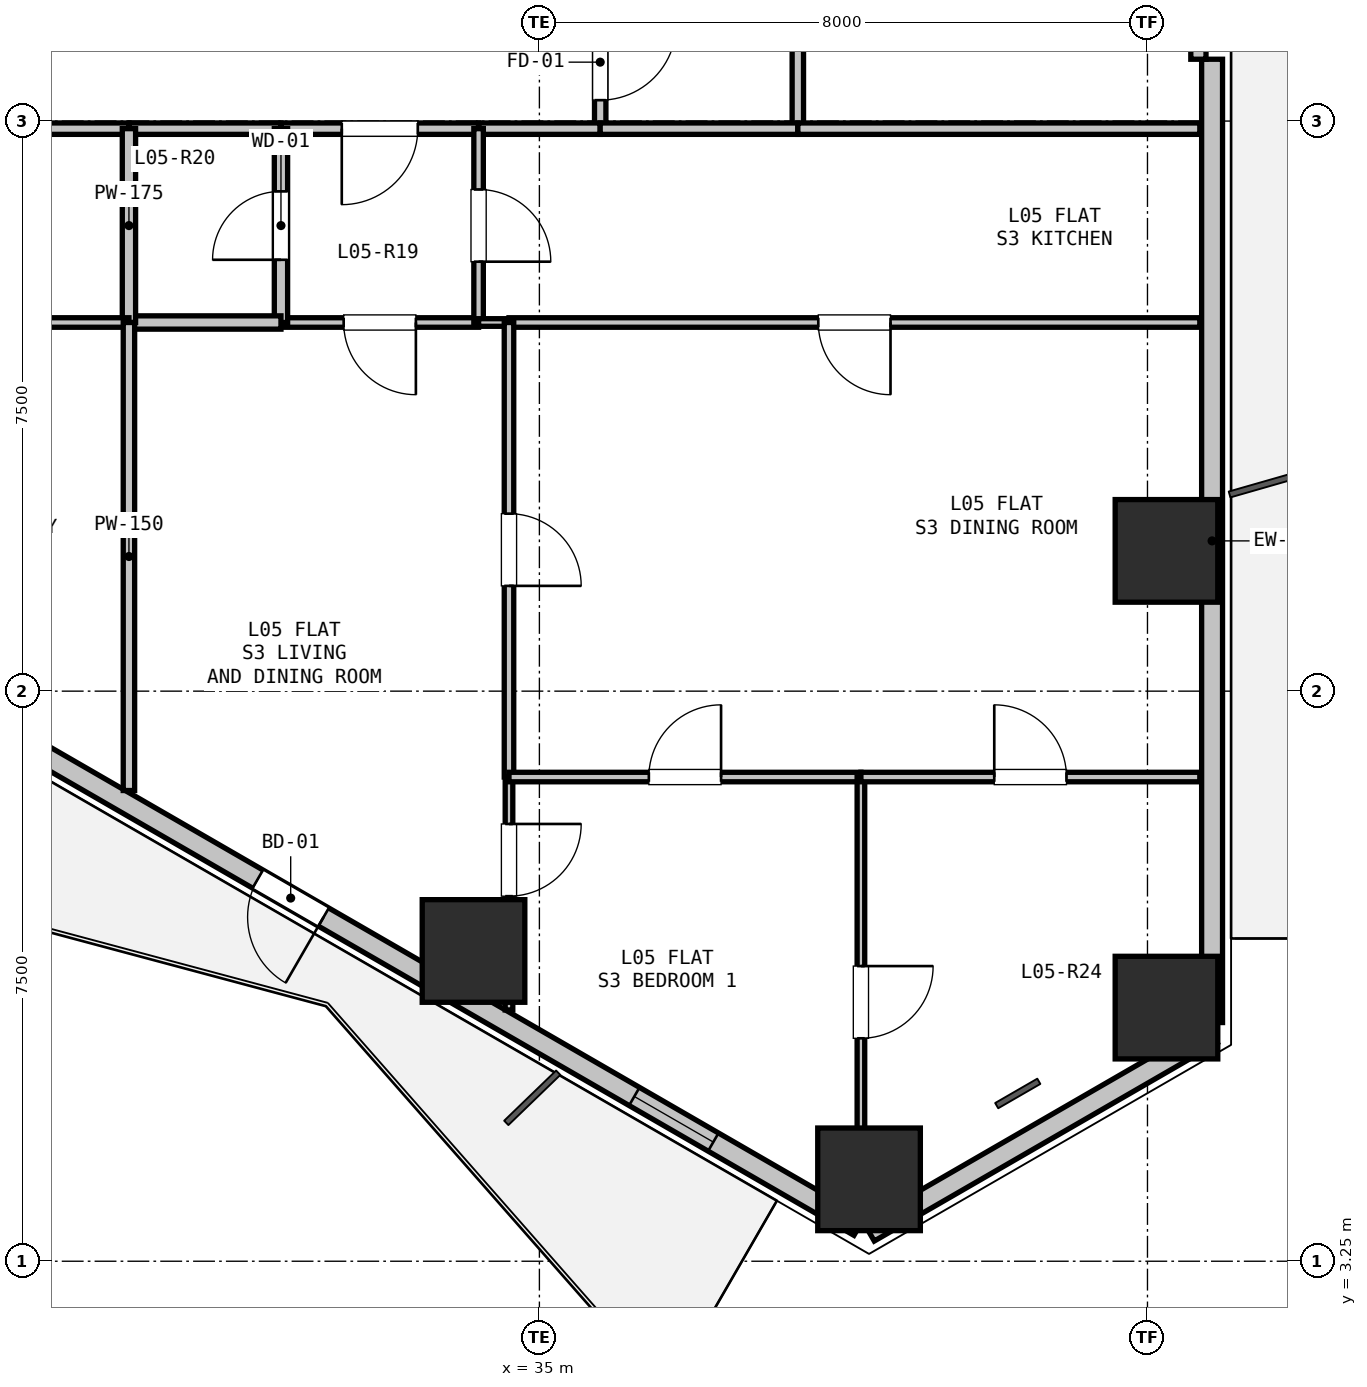
"""IFC4 building model, lengths in metres.
Left out: names, types, materials, properties, quantities, classifications, styles, units other than length and angle.
Written with IfcOpenShell. Run it as: python <this file> out.ifc"""

import sys

from ifc_helpers import new_model, si_unit, direction, frame, frame_2d, origin, origin_2d, place, context, subcontext, project, spatial, rectangle, hollow_rectangle, extrude, element, fill, save


model = new_model("IFC4")
c1 = context("Model", 3, precision=1e-05, world=origin(), true_north=direction((0.0, 1.0)))
c2 = subcontext(c1, "Body", "Model", "MODEL_VIEW")
j1 = project(units=[si_unit("LENGTHUNIT", "METRE"), si_unit("PLANEANGLEUNIT", "RADIAN")], contexts=[c1])
p1 = place(None, origin())
s1 = spatial("IfcSite", under=j1, at=p1, CompositionType="ELEMENT")
p2 = place(p1, origin())
s2 = spatial("IfcBuilding", under=s1, at=p2, CompositionType="ELEMENT")
p3 = place(p2, frame((0.0, 0.0, 22.5)))
s3 = spatial("IfcBuildingStorey", under=s2, at=p3, CompositionType="ELEMENT", Elevation=22.5)
for number, where, z_axis, x_axis in (
    (1, (43.25, 12.595, 0.0), (0.0, 0.0, 1.0), (1.0, 0.0, 0.0)),
    (2, (43.25, 6.587, 0.0), (0.0, 0.0, 1.0), (1.0, 0.0, 0.0)),
    (3, (39.337, 4.327, 0.0), (0.0, 0.0, 1.0), (1.0, 0.0, 0.0)),
    (4, (34.133, 7.332, 0.0), (0.0, 0.0, 1.0), (1.0, 0.0, 0.0)),
):
    element("IfcColumn", number, at=place(p3, frame(where, z_axis=z_axis, x_axis=x_axis)), inside=s3, PredefinedType="COLUMN", context=c2, shape_type="SweptSolid", body=[
        extrude(hollow_rectangle(XDim=1.35, YDim=1.35, WallThickness=0.036, at=origin_2d()), origin(), (0.0, 0.0, 1.0), 3.3),
    ])
p4 = place(p3, frame((43.85, 6.24, 0.0), z_axis=(0.0, 0.0, 1.0), x_axis=(-0.866043601342, -0.499968479581, 0.0)))
e5 = element("IfcWall", 5, at=p4, inside=s3, PredefinedType="SOLIDWALL", context=c2, shape_type="SweptSolid", body=[
    extrude(rectangle(XDim=5.211, YDim=0.275, at=frame_2d((2.605, 0.0))), origin(), (0.0, 0.0, 1.0), 2.66),
])
p5 = place(p3, frame((43.85, 19.063, 0.0), z_axis=(0.0, 0.0, 1.0), x_axis=(0.0, -1.0, 0.0)))
e6 = element("IfcWall", 6, at=p5, inside=s3, PredefinedType="SOLIDWALL", context=c2, shape_type="SweptSolid", body=[
    extrude(rectangle(XDim=12.673, YDim=0.275, at=frame_2d((6.336, 0.0))), origin(), (0.0, 0.0, 1.0), 2.66),
])
p6 = place(p3, frame((43.67, 20.763, 0.0), z_axis=(0.0, 0.0, 1.0), x_axis=(0.0, -1.0, 0.0)))
e7 = element("IfcWall", 7, at=p6, inside=s3, PredefinedType="PARAPET", context=c2, shape_type="SweptSolid", body=[
    extrude(rectangle(XDim=1.7, YDim=0.2, at=frame_2d((0.85, 0.0))), origin(), (0.0, 0.0, 1.0), 2.66),
])
p7 = place(p3, frame((39.207, 3.71, 0.0), z_axis=(0.0, 0.0, 1.0), x_axis=(-0.86603192154, 0.499988710747, 0.0)))
e8 = element("IfcWall", 8, at=p7, inside=s3, PredefinedType="SOLIDWALL", context=c2, shape_type="SweptSolid", body=[
    extrude(rectangle(XDim=12.673, YDim=0.275, at=frame_2d((6.336, 0.0))), origin(), (0.0, 0.0, 1.0), 2.66),
])
p8 = place(p7, frame((8.136, 0.0, 0.0)))
e9 = element("IfcOpeningElement", 9, at=p8, cuts=e8, PredefinedType="OPENING", context=c2, shape_type="SweptSolid", body=[
    extrude(rectangle(XDim=1.0, YDim=2.1, at=frame_2d((0.5, 1.05))), frame((0.0, 0.147, 0.0), z_axis=(0.0, -1.0, 0.0), x_axis=(1.0, 0.0, 0.0)), (0.0, 0.0, 1.0), 0.295),
])
p9 = place(p7, frame((2.216, 0.0, 0.9)))
e10 = element("IfcOpeningElement", 10, at=p9, cuts=e8, PredefinedType="OPENING", context=c2, shape_type="SweptSolid", body=[
    extrude(rectangle(XDim=1.2, YDim=1.4, at=frame_2d((0.6, 0.7))), frame((0.0, 0.147, 0.0), z_axis=(0.0, -1.0, 0.0), x_axis=(1.0, 0.0, 0.0)), (0.0, 0.0, 1.0), 0.295),
])
p10 = place(p3, frame((35.8, 19.9, 0.0), z_axis=(0.0, 0.0, 1.0), x_axis=(0.0, -1.0, 0.0)))
e11 = element("IfcWall", 11, at=p10, inside=s3, PredefinedType="PARTITIONING", context=c2, shape_type="SweptSolid", body=[
    extrude(rectangle(XDim=1.75, YDim=0.15, at=frame_2d((0.875, 0.0))), origin(), (0.0, 0.0, 1.0), 3.04),
])
p11 = place(p10, frame((0.375, 0.0, 0.0)))
e12 = element("IfcOpeningElement", 12, at=p11, cuts=e11, PredefinedType="OPENING", context=c2, shape_type="SweptSolid", body=[
    extrude(rectangle(XDim=1.0, YDim=2.15, at=frame_2d((0.5, 1.075))), frame((0.0, 0.085, 0.0), z_axis=(0.0, -1.0, 0.0), x_axis=(1.0, 0.0, 0.0)), (0.0, 0.0, 1.0), 0.17),
])
p12 = place(p3, frame((35.8, 18.15, 0.0), z_axis=(0.0, 0.0, 1.0), x_axis=(-1.0, 0.0, 0.0)))
e13 = element("IfcWall", 13, at=p12, inside=s3, PredefinedType="PARTITIONING", context=c2, shape_type="SweptSolid", body=[
    extrude(rectangle(XDim=1.6, YDim=0.15, at=frame_2d((0.8, 0.0))), origin(), (0.0, 0.0, 1.0), 3.04),
])
p13 = place(p3, frame((34.2, 18.15, 0.0), z_axis=(0.0, 0.0, 1.0), x_axis=(-1.0, 0.0, 0.0)))
e14 = element("IfcWall", 14, at=p13, inside=s3, PredefinedType="PARTITIONING", context=c2, shape_type="SweptSolid", body=[
    extrude(rectangle(XDim=2.6, YDim=0.15, at=frame_2d((1.3, 0.0))), origin(), (0.0, 0.0, 1.0), 3.04),
])
p14 = place(p13, frame((0.8, 0.0, 0.0)))
e15 = element("IfcOpeningElement", 15, at=p14, cuts=e14, PredefinedType="OPENING", context=c2, shape_type="SweptSolid", body=[
    extrude(rectangle(XDim=1.0, YDim=2.15, at=frame_2d((0.5, 1.075))), frame((0.0, 0.085, 0.0), z_axis=(0.0, -1.0, 0.0), x_axis=(1.0, 0.0, 0.0)), (0.0, 0.0, 1.0), 0.17),
])
p15 = place(p3, frame((31.6, 18.15, 0.0), z_axis=(0.0, 0.0, 1.0), x_axis=(-1.0, 0.0, 0.0)))
e16 = element("IfcWall", 16, at=p15, inside=s3, PredefinedType="PARTITIONING", context=c2, shape_type="SweptSolid", body=[
    extrude(rectangle(XDim=2.0, YDim=0.15, at=frame_2d((1.0, 0.0))), origin(), (0.0, 0.0, 1.0), 3.04),
])
p16 = place(p3, frame((29.6, 18.15, 0.0), z_axis=(0.0, 0.0, 1.0), x_axis=(-1.0, 0.0, 0.0)))
e17 = element("IfcWall", 17, at=p16, inside=s3, PredefinedType="PARTITIONING", context=c2, shape_type="SweptSolid", body=[
    extrude(rectangle(XDim=2.5, YDim=0.15, at=frame_2d((1.25, 0.0))), origin(), (0.0, 0.0, 1.0), 3.04),
])
p17 = place(p3, frame((38.4, 21.4, 0.0), z_axis=(0.0, 0.0, 1.0), x_axis=(0.0, -1.0, 0.0)))
e18 = element("IfcWall", 18, at=p17, inside=s3, PredefinedType="PARTITIONING", context=c2, shape_type="SweptSolid", body=[
    extrude(rectangle(XDim=3.25, YDim=0.15, at=frame_2d((1.625, 0.0))), origin(), (0.0, 0.0, 1.0), 3.04),
])
p18 = place(p3, frame((38.4, 18.15, 0.0), z_axis=(0.0, 0.0, 1.0), x_axis=(-1.0, 0.0, 0.0)))
e19 = element("IfcWall", 19, at=p18, inside=s3, PredefinedType="PARTITIONING", context=c2, shape_type="SweptSolid", body=[
    extrude(rectangle(XDim=2.6, YDim=0.15, at=frame_2d((1.3, 0.0))), origin(), (0.0, 0.0, 1.0), 2.337),
])
p19 = place(p3, frame((34.2, 15.6, 0.0), z_axis=(0.0, 0.0, 1.0), x_axis=(-1.0, 0.0, 0.0)))
e20 = element("IfcWall", 20, at=p19, inside=s3, PredefinedType="PARTITIONING", context=c2, shape_type="SweptSolid", body=[
    extrude(rectangle(XDim=2.6, YDim=0.125, at=frame_2d((1.3, 0.0))), origin(), (0.0, 0.0, 1.0), 3.04),
])
p20 = place(p19, frame((0.825, 0.0, 0.0)))
e21 = element("IfcOpeningElement", 21, at=p20, cuts=e20, PredefinedType="OPENING", context=c2, shape_type="SweptSolid", body=[
    extrude(rectangle(XDim=0.95, YDim=2.1, at=frame_2d((0.475, 1.05))), frame((0.0, 0.073, 0.0), z_axis=(0.0, -1.0, 0.0), x_axis=(1.0, 0.0, 0.0)), (0.0, 0.0, 1.0), 0.145),
])
p21 = place(p3, frame((31.6, 15.6, 0.0), z_axis=(0.0, 0.0, 1.0), x_axis=(0.0, 1.0, 0.0)))
e22 = element("IfcWall", 22, at=p21, inside=s3, PredefinedType="PLUMBINGWALL", context=c2, shape_type="SweptSolid", body=[
    extrude(rectangle(XDim=2.55, YDim=0.175, at=frame_2d((1.275, 0.0))), origin(), (0.0, 0.0, 1.0), 3.04),
])
p22 = place(p21, frame((0.825, 0.0, 0.0)))
e23 = element("IfcOpeningElement", 23, at=p22, cuts=e22, PredefinedType="OPENING", context=c2, shape_type="SweptSolid", body=[
    extrude(rectangle(XDim=0.9, YDim=2.1, at=frame_2d((0.45, 1.05))), frame((0.0, 0.097, 0.0), z_axis=(0.0, -1.0, 0.0), x_axis=(1.0, 0.0, 0.0)), (0.0, 0.0, 1.0), 0.195),
])
p23 = place(p3, frame((34.2, 18.15, 0.0), z_axis=(0.0, 0.0, 1.0), x_axis=(0.0, -1.0, 0.0)))
e24 = element("IfcWall", 24, at=p23, inside=s3, PredefinedType="PARTITIONING", context=c2, shape_type="SweptSolid", body=[
    extrude(rectangle(XDim=2.55, YDim=0.125, at=frame_2d((1.275, 0.0))), origin(), (0.0, 0.0, 1.0), 3.04),
])
p24 = place(p23, frame((0.8, 0.0, 0.0)))
e25 = element("IfcOpeningElement", 25, at=p24, cuts=e24, PredefinedType="OPENING", context=c2, shape_type="SweptSolid", body=[
    extrude(rectangle(XDim=0.95, YDim=2.1, at=frame_2d((0.475, 1.05))), frame((0.0, 0.073, 0.0), z_axis=(0.0, -1.0, 0.0), x_axis=(1.0, 0.0, 0.0)), (0.0, 0.0, 1.0), 0.145),
])
p25 = place(p3, frame((31.6, 15.6, 0.0), z_axis=(0.0, 0.0, 1.0), x_axis=(-1.0, 0.0, 0.0)))
e26 = element("IfcWall", 26, at=p25, inside=s3, PredefinedType="PLUMBINGWALL", context=c2, shape_type="SweptSolid", body=[
    extrude(rectangle(XDim=2.0, YDim=0.175, at=frame_2d((1.0, 0.0))), origin(), (0.0, 0.0, 1.0), 3.04),
])
p26 = place(p3, frame((29.6, 15.6, 0.0), z_axis=(0.0, 0.0, 1.0), x_axis=(0.0, 1.0, 0.0)))
e27 = element("IfcWall", 27, at=p26, inside=s3, PredefinedType="PLUMBINGWALL", context=c2, shape_type="SweptSolid", body=[
    extrude(rectangle(XDim=2.55, YDim=0.175, at=frame_2d((1.275, 0.0))), origin(), (0.0, 0.0, 1.0), 3.04),
])
p27 = place(p3, frame((38.4, 18.15, 0.0), z_axis=(0.0, 0.0, 1.0), x_axis=(1.0, 0.0, 0.0)))
e28 = element("IfcWall", 28, at=p27, inside=s3, PredefinedType="PARTITIONING", context=c2, shape_type="SweptSolid", body=[
    extrude(rectangle(XDim=5.289, YDim=0.15, at=frame_2d((2.644, 0.0))), origin(), (0.0, 0.0, 1.0), 2.365),
])
p28 = place(p3, frame((43.688, 15.6, 0.0), z_axis=(0.0, 0.0, 1.0), x_axis=(-1.0, 0.0, 0.0)))
e29 = element("IfcWall", 29, at=p28, inside=s3, PredefinedType="PARTITIONING", context=c2, shape_type="SweptSolid", body=[
    extrude(rectangle(XDim=9.088, YDim=0.125, at=frame_2d((4.544, 0.0))), origin(), (0.0, 0.0, 1.0), 2.337),
])
p29 = place(p28, frame((4.069, 0.0, 0.0)))
e30 = element("IfcOpeningElement", 30, at=p29, cuts=e29, PredefinedType="OPENING", context=c2, shape_type="SweptSolid", body=[
    extrude(rectangle(XDim=0.95, YDim=2.1, at=frame_2d((0.475, 1.05))), frame((0.0, 0.073, 0.0), z_axis=(0.0, -1.0, 0.0), x_axis=(1.0, 0.0, 0.0)), (0.0, 0.0, 1.0), 0.145),
])
p30 = place(p3, frame((34.6, 15.6, 0.0), z_axis=(0.0, 0.0, 1.0), x_axis=(-1.0, 0.0, 0.0)))
e31 = element("IfcWall", 31, at=p30, inside=s3, PredefinedType="PARTITIONING", context=c2, shape_type="SweptSolid", body=[
    extrude(rectangle(XDim=0.4, YDim=0.1, at=frame_2d((0.2, 0.0))), origin(), (0.0, 0.0, 1.0), 3.04),
])
p31 = place(p3, frame((27.1, 15.6, 0.0), z_axis=(0.0, 0.0, 1.0), x_axis=(1.0, 0.0, 0.0)))
e32 = element("IfcWall", 32, at=p31, inside=s3, PredefinedType="PARTITIONING", context=c2, shape_type="SweptSolid", body=[
    extrude(rectangle(XDim=2.5, YDim=0.125, at=frame_2d((1.25, 0.0))), origin(), (0.0, 0.0, 1.0), 3.04),
])
p32 = place(p3, frame((29.6, 15.6, 0.0), z_axis=(0.0, 0.0, 1.0), x_axis=(0.0, -1.0, 0.0)))
e33 = element("IfcWall", 33, at=p32, inside=s3, PredefinedType="PARTITIONING", context=c2, shape_type="SweptSolid", body=[
    extrude(rectangle(XDim=6.157, YDim=0.15, at=frame_2d((3.079, 0.0))), origin(), (0.0, 0.0, 1.0), 2.337),
])
p33 = place(p3, frame((34.6, 15.6, 0.0), z_axis=(0.0, 0.0, 1.0), x_axis=(0.0, -1.0, 0.0)))
e34 = element("IfcWall", 34, at=p33, inside=s3, PredefinedType="PARTITIONING", context=c2, shape_type="SweptSolid", body=[
    extrude(rectangle(XDim=5.98, YDim=0.125, at=frame_2d((2.99, 0.0))), origin(), (0.0, 0.0, 1.0), 3.04),
])
p34 = place(p33, frame((2.515, 0.0, 0.0)))
e35 = element("IfcOpeningElement", 35, at=p34, cuts=e34, PredefinedType="OPENING", context=c2, shape_type="SweptSolid", body=[
    extrude(rectangle(XDim=0.95, YDim=2.1, at=frame_2d((0.475, 1.05))), frame((0.0, 0.073, 0.0), z_axis=(0.0, -1.0, 0.0), x_axis=(1.0, 0.0, 0.0)), (0.0, 0.0, 1.0), 0.145),
])
p35 = place(p3, frame((34.6, 9.62, 0.0), z_axis=(0.0, 0.0, 1.0), x_axis=(0.0, -1.0, 0.0)))
e36 = element("IfcWall", 36, at=p35, inside=s3, PredefinedType="PARTITIONING", context=c2, shape_type="SweptSolid", body=[
    extrude(rectangle(XDim=3.064, YDim=0.1, at=frame_2d((1.532, 0.0))), origin(), (0.0, 0.0, 1.0), 2.65),
])
p36 = place(p35, frame((0.617, 0.0, 0.0)))
e37 = element("IfcOpeningElement", 37, at=p36, cuts=e36, PredefinedType="OPENING", context=c2, shape_type="SweptSolid", body=[
    extrude(rectangle(XDim=0.95, YDim=2.1, at=frame_2d((0.475, 1.05))), frame((0.0, 0.06, 0.0), z_axis=(0.0, -1.0, 0.0), x_axis=(1.0, 0.0, 0.0)), (0.0, 0.0, 1.0), 0.12),
])
p37 = place(p3, frame((34.6, 9.62, 0.0), z_axis=(0.0, 0.0, 1.0), x_axis=(1.0, 0.0, 0.0)))
e38 = element("IfcWall", 38, at=p37, inside=s3, PredefinedType="PARTITIONING", context=c2, shape_type="SweptSolid", body=[
    extrude(rectangle(XDim=4.63, YDim=0.125, at=frame_2d((2.315, 0.0))), origin(), (0.0, 0.0, 1.0), 3.04),
])
p38 = place(p37, frame((1.84, 0.0, 0.0)))
e39 = element("IfcOpeningElement", 39, at=p38, cuts=e38, PredefinedType="OPENING", context=c2, shape_type="SweptSolid", body=[
    extrude(rectangle(XDim=0.95, YDim=2.1, at=frame_2d((0.475, 1.05))), frame((0.0, 0.073, 0.0), z_axis=(0.0, -1.0, 0.0), x_axis=(1.0, 0.0, 0.0)), (0.0, 0.0, 1.0), 0.145),
])
p39 = place(p3, frame((39.23, 9.62, 0.0), z_axis=(0.0, 0.0, 1.0), x_axis=(0.0, -1.0, 0.0)))
e40 = element("IfcWall", 40, at=p39, inside=s3, PredefinedType="PARTITIONING", context=c2, shape_type="SweptSolid", body=[
    extrude(rectangle(XDim=5.924, YDim=0.1, at=frame_2d((2.962, 0.0))), origin(), (0.0, 0.0, 1.0), 3.04),
])
p40 = place(p39, frame((2.487, 0.0, 0.0)))
e41 = element("IfcOpeningElement", 41, at=p40, cuts=e40, PredefinedType="OPENING", context=c2, shape_type="SweptSolid", body=[
    extrude(rectangle(XDim=0.95, YDim=2.1, at=frame_2d((0.475, 1.05))), frame((0.0, 0.06, 0.0), z_axis=(0.0, -1.0, 0.0), x_axis=(1.0, 0.0, 0.0)), (0.0, 0.0, 1.0), 0.12),
])
p41 = place(p3, frame((39.23, 9.62, 0.0), z_axis=(0.0, 0.0, 1.0), x_axis=(1.0, 0.0, 0.0)))
e42 = element("IfcWall", 42, at=p41, inside=s3, PredefinedType="PARTITIONING", context=c2, shape_type="SweptSolid", body=[
    extrude(rectangle(XDim=4.458, YDim=0.125, at=frame_2d((2.229, 0.0))), origin(), (0.0, 0.0, 1.0), 2.337),
])
p42 = place(p41, frame((1.754, 0.0, 0.0)))
e43 = element("IfcOpeningElement", 43, at=p42, cuts=e42, PredefinedType="OPENING", context=c2, shape_type="SweptSolid", body=[
    extrude(rectangle(XDim=0.95, YDim=2.1, at=frame_2d((0.475, 1.05))), frame((0.0, 0.073, 0.0), z_axis=(0.0, -1.0, 0.0), x_axis=(1.0, 0.0, 0.0)), (0.0, 0.0, 1.0), 0.145),
])
p43 = place(p8, origin())
e44 = element("IfcDoor", 44, at=p43, inside=s3, OperationType="SINGLE_SWING_LEFT", PredefinedType="DOOR", context=c2, shape_type="SweptSolid", body=[
    extrude(rectangle(XDim=1.0, YDim=2.1, at=frame_2d((0.5, 1.05))), frame((0.0, 0.025, 0.0), z_axis=(0.0, -1.0, 0.0), x_axis=(1.0, 0.0, 0.0)), (0.0, 0.0, 1.0), 0.05),
])
fill(e9, e44)
p44 = place(p9, origin())
e45 = element("IfcWindow", 45, at=p44, inside=s3, PartitioningType="SINGLE_PANEL", PredefinedType="WINDOW", context=c2, shape_type="SweptSolid", body=[
    extrude(rectangle(XDim=1.2, YDim=1.4, at=frame_2d((0.6, 0.7))), frame((0.0, 0.03, 0.0), z_axis=(0.0, -1.0, 0.0), x_axis=(1.0, 0.0, 0.0)), (0.0, 0.0, 1.0), 0.06),
])
fill(e10, e45)
p45 = place(p11, origin())
e46 = element("IfcDoor", 46, at=p45, inside=s3, OperationType="SINGLE_SWING_LEFT", PredefinedType="DOOR", context=c2, shape_type="SweptSolid", body=[
    extrude(rectangle(XDim=1.0, YDim=2.15, at=frame_2d((0.5, 1.075))), frame((0.0, 0.025, 0.0), z_axis=(0.0, -1.0, 0.0), x_axis=(1.0, 0.0, 0.0)), (0.0, 0.0, 1.0), 0.05),
])
fill(e12, e46)
p46 = place(p14, origin())
e47 = element("IfcDoor", 47, at=p46, inside=s3, OperationType="SINGLE_SWING_RIGHT", PredefinedType="DOOR", context=c2, shape_type="SweptSolid", body=[
    extrude(rectangle(XDim=1.0, YDim=2.15, at=frame_2d((0.5, 1.075))), frame((0.0, 0.025, 0.0), z_axis=(0.0, -1.0, 0.0), x_axis=(1.0, 0.0, 0.0)), (0.0, 0.0, 1.0), 0.05),
])
fill(e15, e47)
p47 = place(p22, origin())
e48 = element("IfcDoor", 48, at=p47, inside=s3, OperationType="SINGLE_SWING_LEFT", PredefinedType="DOOR", context=c2, shape_type="SweptSolid", body=[
    extrude(rectangle(XDim=0.9, YDim=2.1, at=frame_2d((0.45, 1.05))), frame((0.0, 0.025, 0.0), z_axis=(0.0, -1.0, 0.0), x_axis=(1.0, 0.0, 0.0)), (0.0, 0.0, 1.0), 0.05),
])
fill(e23, e48)
p48 = place(p24, origin())
e49 = element("IfcDoor", 49, at=p48, inside=s3, OperationType="SINGLE_SWING_RIGHT", PredefinedType="DOOR", context=c2, shape_type="SweptSolid", body=[
    extrude(rectangle(XDim=0.95, YDim=2.1, at=frame_2d((0.475, 1.05))), frame((0.0, 0.025, 0.0), z_axis=(0.0, -1.0, 0.0), x_axis=(1.0, 0.0, 0.0)), (0.0, 0.0, 1.0), 0.05),
])
fill(e25, e49)
p49 = place(p20, origin())
e50 = element("IfcDoor", 50, at=p49, inside=s3, OperationType="SINGLE_SWING_LEFT", PredefinedType="DOOR", context=c2, shape_type="SweptSolid", body=[
    extrude(rectangle(XDim=0.95, YDim=2.1, at=frame_2d((0.475, 1.05))), frame((0.0, 0.025, 0.0), z_axis=(0.0, -1.0, 0.0), x_axis=(1.0, 0.0, 0.0)), (0.0, 0.0, 1.0), 0.05),
])
fill(e21, e50)
p50 = place(p29, origin())
e51 = element("IfcDoor", 51, at=p50, inside=s3, OperationType="SINGLE_SWING_LEFT", PredefinedType="DOOR", context=c2, shape_type="SweptSolid", body=[
    extrude(rectangle(XDim=0.95, YDim=2.1, at=frame_2d((0.475, 1.05))), frame((0.0, 0.025, 0.0), z_axis=(0.0, -1.0, 0.0), x_axis=(1.0, 0.0, 0.0)), (0.0, 0.0, 1.0), 0.05),
])
fill(e30, e51)
p51 = place(p36, origin())
e52 = element("IfcDoor", 52, at=p51, inside=s3, OperationType="SINGLE_SWING_LEFT", PredefinedType="DOOR", context=c2, shape_type="SweptSolid", body=[
    extrude(rectangle(XDim=0.95, YDim=2.1, at=frame_2d((0.475, 1.05))), frame((0.0, 0.025, 0.0), z_axis=(0.0, -1.0, 0.0), x_axis=(1.0, 0.0, 0.0)), (0.0, 0.0, 1.0), 0.05),
])
fill(e37, e52)
p52 = place(p34, origin())
e53 = element("IfcDoor", 53, at=p52, inside=s3, OperationType="SINGLE_SWING_RIGHT", PredefinedType="DOOR", context=c2, shape_type="SweptSolid", body=[
    extrude(rectangle(XDim=0.95, YDim=2.1, at=frame_2d((0.475, 1.05))), frame((0.0, 0.025, 0.0), z_axis=(0.0, -1.0, 0.0), x_axis=(1.0, 0.0, 0.0)), (0.0, 0.0, 1.0), 0.05),
])
fill(e35, e53)
p53 = place(p40, origin())
e54 = element("IfcDoor", 54, at=p53, inside=s3, OperationType="SINGLE_SWING_LEFT", PredefinedType="DOOR", context=c2, shape_type="SweptSolid", body=[
    extrude(rectangle(XDim=0.95, YDim=2.1, at=frame_2d((0.475, 1.05))), frame((0.0, 0.025, 0.0), z_axis=(0.0, -1.0, 0.0), x_axis=(1.0, 0.0, 0.0)), (0.0, 0.0, 1.0), 0.05),
])
fill(e41, e54)
p54 = place(p38, origin())
e55 = element("IfcDoor", 55, at=p54, inside=s3, OperationType="SINGLE_SWING_RIGHT", PredefinedType="DOOR", context=c2, shape_type="SweptSolid", body=[
    extrude(rectangle(XDim=0.95, YDim=2.1, at=frame_2d((0.475, 1.05))), frame((0.0, 0.025, 0.0), z_axis=(0.0, -1.0, 0.0), x_axis=(1.0, 0.0, 0.0)), (0.0, 0.0, 1.0), 0.05),
])
fill(e39, e55)
p55 = place(p42, origin())
e56 = element("IfcDoor", 56, at=p55, inside=s3, OperationType="SINGLE_SWING_LEFT", PredefinedType="DOOR", context=c2, shape_type="SweptSolid", body=[
    extrude(rectangle(XDim=0.95, YDim=2.1, at=frame_2d((0.475, 1.05))), frame((0.0, 0.025, 0.0), z_axis=(0.0, -1.0, 0.0), x_axis=(1.0, 0.0, 0.0)), (0.0, 0.0, 1.0), 0.05),
])
fill(e43, e56)
save(model, sys.argv[1])
